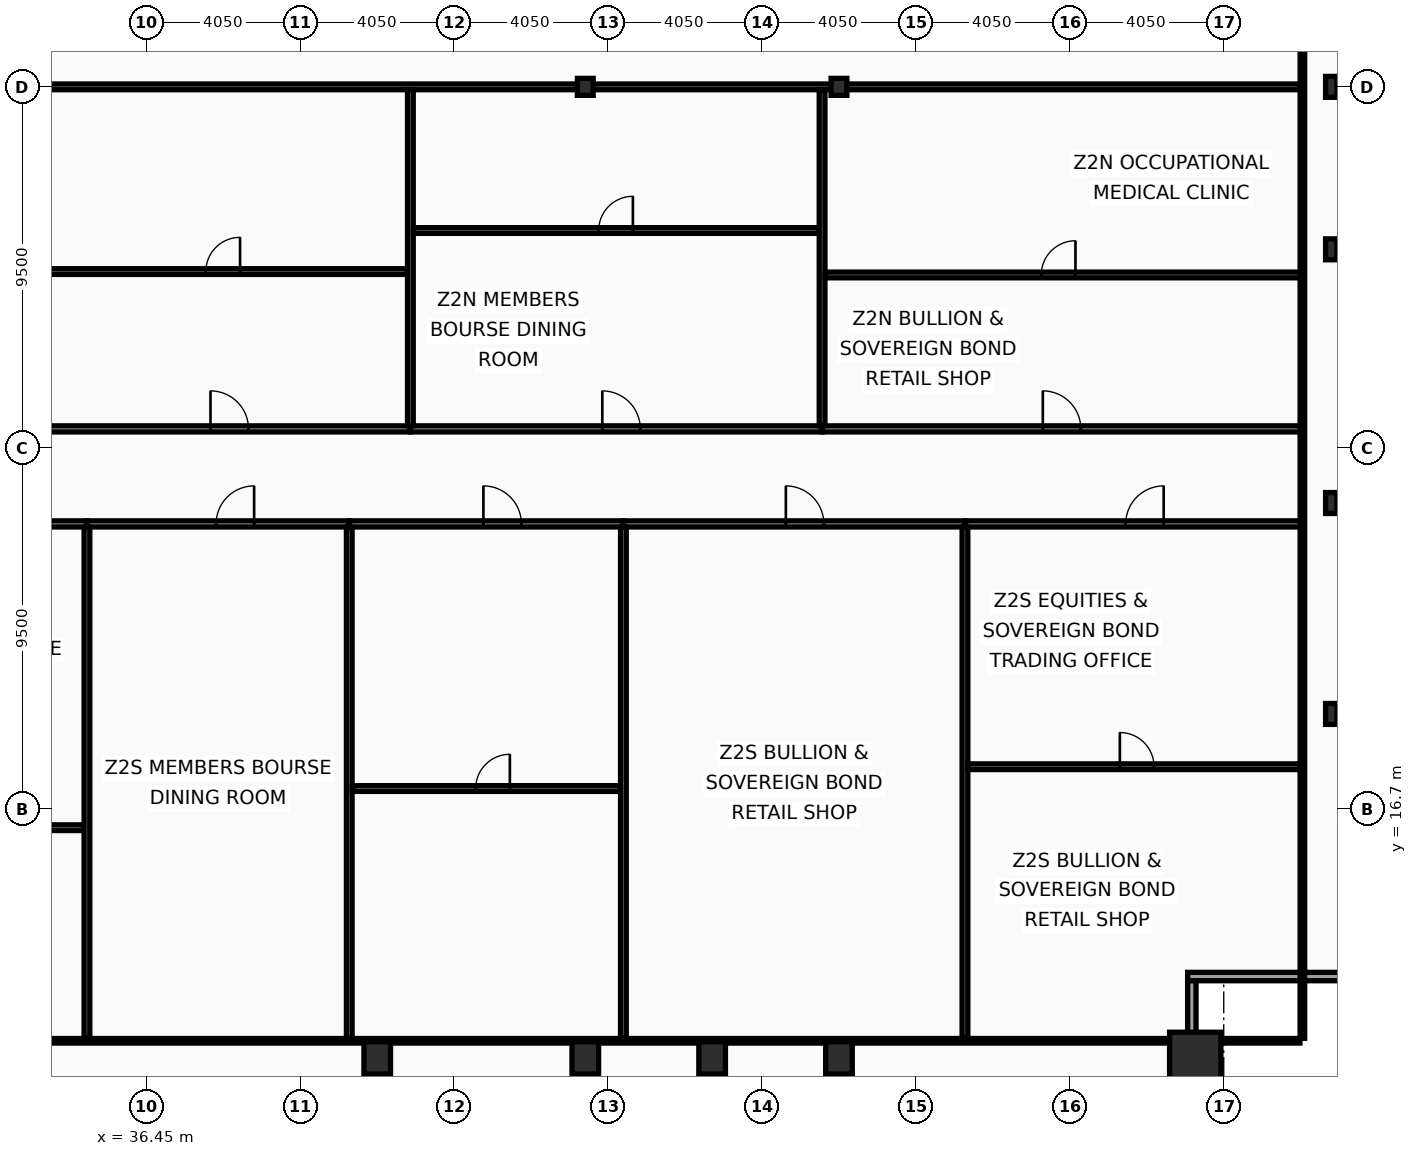
"""IFC4 building model, lengths in metres.
Left out: names, types, materials, properties, quantities, classifications, styles, units other than length and angle.
Written with IfcOpenShell. Run it as: python <this file> out.ifc"""

import sys

from ifc_helpers import new_model, si_unit, direction, frame, frame_2d, origin, origin_2d, place, context, subcontext, project, spatial, rectangle, hollow_rectangle, i_section, extrude, element, fill, save


model = new_model("IFC4")
c1 = context("Model", 3, precision=1e-05, world=origin(), true_north=direction((0.0, 1.0)))
c2 = subcontext(c1, "Body", "Model", "MODEL_VIEW")
j1 = project(units=[si_unit("LENGTHUNIT", "METRE"), si_unit("PLANEANGLEUNIT", "RADIAN")], contexts=[c1])
p1 = place(None, origin())
s1 = spatial("IfcSite", under=j1, at=p1, CompositionType="ELEMENT")
p2 = place(p1, origin())
s2 = spatial("IfcBuilding", under=s1, at=p2, CompositionType="ELEMENT")
p3 = place(p2, frame((0.0, 0.0, 139.8)))
s3 = spatial("IfcBuildingStorey", under=s2, at=p3, CompositionType="ELEMENT", Elevation=139.8)
p4 = place(p3, frame((64.05, 10.15, 0.0), z_axis=(0.0, 0.0, 1.0), x_axis=(1.0, 0.0, 0.0)))
e1 = element("IfcColumn", 1, at=p4, inside=s3, PredefinedType="COLUMN", context=c2, shape_type="SweptSolid", body=[
    extrude(hollow_rectangle(XDim=1.35, YDim=1.35, WallThickness=0.065, at=origin_2d()), origin(), (0.0, 0.0, 1.0), 3.6),
])
for number, where, z_axis, x_axis in (
    (2, (42.525, 10.15, 0.0), (0.0, 0.0, 1.0), (1.0, 0.0, 0.0)),
    (3, (48.0, 10.15, 0.0), (0.0, 0.0, 1.0), (1.0, 0.0, 0.0)),
    (4, (51.337, 10.15, 0.0), (0.0, 0.0, 1.0), (1.0, 0.0, 0.0)),
    (5, (54.675, 10.15, 0.0), (0.0, 0.0, 1.0), (1.0, 0.0, 0.0)),
):
    element("IfcColumn", number, at=place(p3, frame(where, z_axis=z_axis, x_axis=x_axis)), inside=s3, PredefinedType="COLUMN", context=c2, shape_type="SweptSolid", body=[
        extrude(hollow_rectangle(XDim=0.7, YDim=0.85, WallThickness=0.05, at=origin_2d()), origin(), (0.0, 0.0, 1.0), 3.6),
    ])
for number, where, z_axis, x_axis in (
    (6, (67.63, 19.2, 0.0), (0.0, 0.0, 1.0), (1.0, 0.0, 0.0)),
    (7, (67.63, 24.75, 0.0), (0.0, 0.0, 1.0), (1.0, 0.0, 0.0)),
    (8, (67.63, 31.425, 0.0), (0.0, 0.0, 1.0), (1.0, 0.0, 0.0)),
    (9, (67.63, 35.7, 0.0), (0.0, 0.0, 1.0), (1.0, 0.0, 0.0)),
):
    element("IfcColumn", number, at=place(p3, frame(where, z_axis=z_axis, x_axis=x_axis)), inside=s3, PredefinedType="COLUMN", context=c2, shape_type="SweptSolid", body=[
        extrude(i_section(OverallWidth=0.3, OverallDepth=0.55, WebThickness=0.015, FlangeThickness=0.029, at=origin_2d()), origin(), (0.0, 0.0, 1.0), 3.6),
    ])
for number, where, z_axis, x_axis in (
    (10, (48.0, 35.7, 0.0), (0.0, 0.0, 1.0), (1.0, 0.0, 0.0)),
    (11, (54.675, 35.7, 0.0), (0.0, 0.0, 1.0), (1.0, 0.0, 0.0)),
):
    element("IfcColumn", number, at=place(p3, frame(where, z_axis=z_axis, x_axis=x_axis)), inside=s3, PredefinedType="COLUMN", context=c2, shape_type="SweptSolid", body=[
        extrude(i_section(OverallWidth=0.416, OverallDepth=0.446, WebThickness=0.039, FlangeThickness=0.063, at=origin_2d()), origin(), (0.0, 0.0, 1.0), 3.6),
    ])
p5 = place(p3, frame((68.07, 12.29, 0.0), z_axis=(0.0, 0.0, 1.0), x_axis=(-1.0, 0.0, 0.0)))
e12 = element("IfcWall", 12, at=p5, inside=s3, PredefinedType="SOLIDWALL", context=c2, shape_type="SweptSolid", body=[
    extrude(rectangle(XDim=4.22, YDim=0.22, at=frame_2d((2.11, 0.0))), origin(), (0.0, 0.0, 1.0), 2.83),
])
p6 = place(p3, frame((63.96, 12.18, 0.0), z_axis=(0.0, 0.0, 1.0), x_axis=(0.0, -1.0, 0.0)))
e13 = element("IfcWall", 13, at=p6, inside=s3, PredefinedType="SOLIDWALL", context=c2, shape_type="SweptSolid", body=[
    extrude(rectangle(XDim=3.91, YDim=0.22, at=frame_2d((1.955, 0.0))), origin(), (0.0, 0.0, 1.0), 2.83),
])
p7 = place(p3, frame((23.382, 24.2, 0.0), z_axis=(0.0, 0.0, 1.0), x_axis=(1.0, 0.0, 0.0)))
e14 = element("IfcWall", 14, at=p7, inside=s3, PredefinedType="PARTITIONING", context=c2, shape_type="SweptSolid", body=[
    extrude(rectangle(XDim=11.504, YDim=0.16, at=frame_2d((5.752, 0.0))), origin(), (0.0, 0.0, 1.0), 2.73),
])
p8 = place(p7, frame((5.332, 0.0, 0.0)))
e15 = element("IfcOpeningElement", 15, at=p8, cuts=e14, PredefinedType="OPENING", context=c2, shape_type="SweptSolid", body=[
    extrude(rectangle(XDim=1.0, YDim=2.05, at=frame_2d((0.5, 1.025))), frame((0.0, 0.09, 0.0), z_axis=(0.0, -1.0, 0.0), x_axis=(1.0, 0.0, 0.0)), (0.0, 0.0, 1.0), 0.18),
])
p9 = place(p3, frame((23.462, 16.207, 0.0), z_axis=(0.0, 0.0, 1.0), x_axis=(1.0, 0.0, 0.0)))
e16 = element("IfcWall", 16, at=p9, inside=s3, PredefinedType="PARTITIONING", context=c2, shape_type="SweptSolid", body=[
    extrude(rectangle(XDim=11.344, YDim=0.15, at=frame_2d((5.672, 0.0))), origin(), (0.0, 0.0, 1.0), 2.73),
])
p10 = place(p9, frame((5.177, 0.0, 0.0)))
e17 = element("IfcOpeningElement", 17, at=p10, cuts=e16, PredefinedType="OPENING", context=c2, shape_type="SweptSolid", body=[
    extrude(rectangle(XDim=0.9, YDim=2.05, at=frame_2d((0.45, 1.025))), frame((0.0, 0.085, 0.0), z_axis=(0.0, -1.0, 0.0), x_axis=(1.0, 0.0, 0.0)), (0.0, 0.0, 1.0), 0.17),
])
p11 = place(p3, frame((34.886, 24.2, 0.0), z_axis=(0.0, 0.0, 1.0), x_axis=(1.0, 0.0, 0.0)))
e18 = element("IfcWall", 18, at=p11, inside=s3, PredefinedType="PARTITIONING", context=c2, shape_type="SweptSolid", body=[
    extrude(rectangle(XDim=6.902, YDim=0.16, at=frame_2d((3.451, 0.0))), origin(), (0.0, 0.0, 1.0), 3.44),
])
p12 = place(p11, frame((3.399, 0.0, 0.0)))
e19 = element("IfcOpeningElement", 19, at=p12, cuts=e18, PredefinedType="OPENING", context=c2, shape_type="SweptSolid", body=[
    extrude(rectangle(XDim=1.0, YDim=2.05, at=frame_2d((0.5, 1.025))), frame((0.0, 0.09, 0.0), z_axis=(0.0, -1.0, 0.0), x_axis=(1.0, 0.0, 0.0)), (0.0, 0.0, 1.0), 0.18),
])
p13 = place(p3, frame((34.886, 10.665, 0.0), z_axis=(0.0, 0.0, 1.0), x_axis=(0.0, 1.0, 0.0)))
e20 = element("IfcWall", 20, at=p13, inside=s3, PredefinedType="PARTITIONING", context=c2, shape_type="SweptSolid", body=[
    extrude(rectangle(XDim=13.45, YDim=0.15, at=frame_2d((6.725, 0.0))), origin(), (0.0, 0.0, 1.0), 2.93),
])
p14 = place(p3, frame((41.789, 24.2, 0.0), z_axis=(0.0, 0.0, 1.0), x_axis=(1.0, 0.0, 0.0)))
e21 = element("IfcWall", 21, at=p14, inside=s3, PredefinedType="PARTITIONING", context=c2, shape_type="SweptSolid", body=[
    extrude(rectangle(XDim=7.214, YDim=0.16, at=frame_2d((3.607, 0.0))), origin(), (0.0, 0.0, 1.0), 2.73),
])
p15 = place(p14, frame((3.53, 0.0, 0.0)))
e22 = element("IfcOpeningElement", 22, at=p15, cuts=e21, PredefinedType="OPENING", context=c2, shape_type="SweptSolid", body=[
    extrude(rectangle(XDim=1.0, YDim=2.05, at=frame_2d((0.5, 1.025))), frame((0.0, 0.09, 0.0), z_axis=(0.0, -1.0, 0.0), x_axis=(1.0, 0.0, 0.0)), (0.0, 0.0, 1.0), 0.18),
])
p16 = place(p3, frame((41.789, 10.665, 0.0), z_axis=(0.0, 0.0, 1.0), x_axis=(0.0, 1.0, 0.0)))
e23 = element("IfcWall", 23, at=p16, inside=s3, PredefinedType="PARTITIONING", context=c2, shape_type="SweptSolid", body=[
    extrude(rectangle(XDim=13.45, YDim=0.15, at=frame_2d((6.725, 0.0))), origin(), (0.0, 0.0, 1.0), 2.93),
])
p17 = place(p3, frame((41.869, 17.238, 0.0), z_axis=(0.0, 0.0, 1.0), x_axis=(1.0, 0.0, 0.0)))
e24 = element("IfcWall", 24, at=p17, inside=s3, PredefinedType="PARTITIONING", context=c2, shape_type="SweptSolid", body=[
    extrude(rectangle(XDim=7.054, YDim=0.15, at=frame_2d((3.527, 0.0))), origin(), (0.0, 0.0, 1.0), 2.73),
])
p18 = place(p17, frame((3.246, 0.0, 0.0)))
e25 = element("IfcOpeningElement", 25, at=p18, cuts=e24, PredefinedType="OPENING", context=c2, shape_type="SweptSolid", body=[
    extrude(rectangle(XDim=0.9, YDim=2.05, at=frame_2d((0.45, 1.025))), frame((0.0, 0.085, 0.0), z_axis=(0.0, -1.0, 0.0), x_axis=(1.0, 0.0, 0.0)), (0.0, 0.0, 1.0), 0.17),
])
p19 = place(p3, frame((49.003, 24.2, 0.0), z_axis=(0.0, 0.0, 1.0), x_axis=(1.0, 0.0, 0.0)))
e26 = element("IfcWall", 26, at=p19, inside=s3, PredefinedType="PARTITIONING", context=c2, shape_type="SweptSolid", body=[
    extrude(rectangle(XDim=8.988, YDim=0.16, at=frame_2d((4.494, 0.0))), origin(), (0.0, 0.0, 1.0), 2.73),
])
p20 = place(p19, frame((4.275, 0.0, 0.0)))
e27 = element("IfcOpeningElement", 27, at=p20, cuts=e26, PredefinedType="OPENING", context=c2, shape_type="SweptSolid", body=[
    extrude(rectangle(XDim=1.0, YDim=2.05, at=frame_2d((0.5, 1.025))), frame((0.0, 0.09, 0.0), z_axis=(0.0, -1.0, 0.0), x_axis=(1.0, 0.0, 0.0)), (0.0, 0.0, 1.0), 0.18),
])
p21 = place(p3, frame((49.003, 10.665, 0.0), z_axis=(0.0, 0.0, 1.0), x_axis=(0.0, 1.0, 0.0)))
e28 = element("IfcWall", 28, at=p21, inside=s3, PredefinedType="PARTITIONING", context=c2, shape_type="SweptSolid", body=[
    extrude(rectangle(XDim=13.45, YDim=0.15, at=frame_2d((6.725, 0.0))), origin(), (0.0, 0.0, 1.0), 2.93),
])
p22 = place(p3, frame((57.99, 24.2, 0.0), z_axis=(0.0, 0.0, 1.0), x_axis=(1.0, 0.0, 0.0)))
e29 = element("IfcWall", 29, at=p22, inside=s3, PredefinedType="PARTITIONING", context=c2, shape_type="SweptSolid", body=[
    extrude(rectangle(XDim=8.88, YDim=0.16, at=frame_2d((4.44, 0.0))), origin(), (0.0, 0.0, 1.0), 3.44),
])
p23 = place(p22, frame((4.229, 0.0, 0.0)))
e30 = element("IfcOpeningElement", 30, at=p23, cuts=e29, PredefinedType="OPENING", context=c2, shape_type="SweptSolid", body=[
    extrude(rectangle(XDim=1.0, YDim=2.05, at=frame_2d((0.5, 1.025))), frame((0.0, 0.09, 0.0), z_axis=(0.0, -1.0, 0.0), x_axis=(1.0, 0.0, 0.0)), (0.0, 0.0, 1.0), 0.18),
])
p24 = place(p3, frame((57.99, 10.665, 0.0), z_axis=(0.0, 0.0, 1.0), x_axis=(0.0, 1.0, 0.0)))
e31 = element("IfcWall", 31, at=p24, inside=s3, PredefinedType="PARTITIONING", context=c2, shape_type="SweptSolid", body=[
    extrude(rectangle(XDim=13.45, YDim=0.15, at=frame_2d((6.725, 0.0))), origin(), (0.0, 0.0, 1.0), 2.73),
])
p25 = place(p3, frame((58.07, 17.811, 0.0), z_axis=(0.0, 0.0, 1.0), x_axis=(1.0, 0.0, 0.0)))
e32 = element("IfcWall", 32, at=p25, inside=s3, PredefinedType="PARTITIONING", context=c2, shape_type="SweptSolid", body=[
    extrude(rectangle(XDim=8.735, YDim=0.15, at=frame_2d((4.367, 0.0))), origin(), (0.0, 0.0, 1.0), 2.83),
])
p26 = place(p25, frame((3.996, 0.0, 0.0)))
e33 = element("IfcOpeningElement", 33, at=p26, cuts=e32, PredefinedType="OPENING", context=c2, shape_type="SweptSolid", body=[
    extrude(rectangle(XDim=0.9, YDim=2.05, at=frame_2d((0.45, 1.025))), frame((0.0, 0.085, 0.0), z_axis=(0.0, -1.0, 0.0), x_axis=(1.0, 0.0, 0.0)), (0.0, 0.0, 1.0), 0.17),
])
p27 = place(p3, frame((21.81, 35.7, 0.0), z_axis=(0.0, 0.0, 1.0), x_axis=(1.0, 0.0, 0.0)))
e34 = element("IfcWall", 34, at=p27, inside=s3, PredefinedType="PARTITIONING", context=c2, shape_type="SweptSolid", body=[
    extrude(rectangle(XDim=44.995, YDim=0.15, at=frame_2d((22.498, 0.0))), origin(), (0.0, 0.0, 1.0), 2.73),
])
p28 = place(p3, frame((33.466, 26.7, 0.0), z_axis=(0.0, 0.0, 1.0), x_axis=(1.0, 0.0, 0.0)))
e35 = element("IfcWall", 35, at=p28, inside=s3, PredefinedType="PARTITIONING", context=c2, shape_type="SweptSolid", body=[
    extrude(rectangle(XDim=9.931, YDim=0.16, at=frame_2d((4.965, 0.0))), origin(), (0.0, 0.0, 1.0), 2.73),
])
p29 = place(p28, frame((4.671, 0.0, 0.0)))
e36 = element("IfcOpeningElement", 36, at=p29, cuts=e35, PredefinedType="OPENING", context=c2, shape_type="SweptSolid", body=[
    extrude(rectangle(XDim=1.0, YDim=2.05, at=frame_2d((0.5, 1.025))), frame((0.0, 0.09, 0.0), z_axis=(0.0, -1.0, 0.0), x_axis=(1.0, 0.0, 0.0)), (0.0, 0.0, 1.0), 0.18),
])
p30 = place(p3, frame((33.546, 30.84, 0.0), z_axis=(0.0, 0.0, 1.0), x_axis=(1.0, 0.0, 0.0)))
e37 = element("IfcWall", 37, at=p30, inside=s3, PredefinedType="PARTITIONING", context=c2, shape_type="SweptSolid", body=[
    extrude(rectangle(XDim=9.771, YDim=0.15, at=frame_2d((4.885, 0.0))), origin(), (0.0, 0.0, 1.0), 2.73),
])
p31 = place(p30, frame((4.469, 0.0, 0.0)))
e38 = element("IfcOpeningElement", 38, at=p31, cuts=e37, PredefinedType="OPENING", context=c2, shape_type="SweptSolid", body=[
    extrude(rectangle(XDim=0.9, YDim=2.05, at=frame_2d((0.45, 1.025))), frame((0.0, 0.085, 0.0), z_axis=(0.0, -1.0, 0.0), x_axis=(1.0, 0.0, 0.0)), (0.0, 0.0, 1.0), 0.17),
])
p32 = place(p3, frame((43.397, 26.7, 0.0), z_axis=(0.0, 0.0, 1.0), x_axis=(1.0, 0.0, 0.0)))
e39 = element("IfcWall", 39, at=p32, inside=s3, PredefinedType="PARTITIONING", context=c2, shape_type="SweptSolid", body=[
    extrude(rectangle(XDim=10.833, YDim=0.16, at=frame_2d((5.417, 0.0))), origin(), (0.0, 0.0, 1.0), 2.73),
])
p33 = place(p32, frame((5.05, 0.0, 0.0)))
e40 = element("IfcOpeningElement", 40, at=p33, cuts=e39, PredefinedType="OPENING", context=c2, shape_type="SweptSolid", body=[
    extrude(rectangle(XDim=1.0, YDim=2.05, at=frame_2d((0.5, 1.025))), frame((0.0, 0.09, 0.0), z_axis=(0.0, -1.0, 0.0), x_axis=(1.0, 0.0, 0.0)), (0.0, 0.0, 1.0), 0.18),
])
p34 = place(p3, frame((43.397, 26.785, 0.0), z_axis=(0.0, 0.0, 1.0), x_axis=(0.0, 1.0, 0.0)))
e41 = element("IfcWall", 41, at=p34, inside=s3, PredefinedType="PARTITIONING", context=c2, shape_type="SweptSolid", body=[
    extrude(rectangle(XDim=8.835, YDim=0.15, at=frame_2d((4.417, 0.0))), origin(), (0.0, 0.0, 1.0), 2.93),
])
p35 = place(p3, frame((43.477, 31.92, 0.0), z_axis=(0.0, 0.0, 1.0), x_axis=(1.0, 0.0, 0.0)))
e42 = element("IfcWall", 42, at=p35, inside=s3, PredefinedType="PARTITIONING", context=c2, shape_type="SweptSolid", body=[
    extrude(rectangle(XDim=10.674, YDim=0.15, at=frame_2d((5.337, 0.0))), origin(), (0.0, 0.0, 1.0), 2.73),
])
p36 = place(p35, frame((4.875, 0.0, 0.0)))
e43 = element("IfcOpeningElement", 43, at=p36, cuts=e42, PredefinedType="OPENING", context=c2, shape_type="SweptSolid", body=[
    extrude(rectangle(XDim=0.9, YDim=2.05, at=frame_2d((0.45, 1.025))), frame((0.0, 0.085, 0.0), z_axis=(0.0, -1.0, 0.0), x_axis=(1.0, 0.0, 0.0)), (0.0, 0.0, 1.0), 0.17),
])
p37 = place(p3, frame((54.231, 26.7, 0.0), z_axis=(0.0, 0.0, 1.0), x_axis=(1.0, 0.0, 0.0)))
e44 = element("IfcWall", 44, at=p37, inside=s3, PredefinedType="PARTITIONING", context=c2, shape_type="SweptSolid", body=[
    extrude(rectangle(XDim=12.639, YDim=0.16, at=frame_2d((6.32, 0.0))), origin(), (0.0, 0.0, 1.0), 2.73),
])
p38 = place(p37, frame((5.809, 0.0, 0.0)))
e45 = element("IfcOpeningElement", 45, at=p38, cuts=e44, PredefinedType="OPENING", context=c2, shape_type="SweptSolid", body=[
    extrude(rectangle(XDim=1.0, YDim=2.05, at=frame_2d((0.5, 1.025))), frame((0.0, 0.09, 0.0), z_axis=(0.0, -1.0, 0.0), x_axis=(1.0, 0.0, 0.0)), (0.0, 0.0, 1.0), 0.18),
])
p39 = place(p3, frame((54.231, 26.785, 0.0), z_axis=(0.0, 0.0, 1.0), x_axis=(0.0, 1.0, 0.0)))
e46 = element("IfcWall", 46, at=p39, inside=s3, PredefinedType="PARTITIONING", context=c2, shape_type="SweptSolid", body=[
    extrude(rectangle(XDim=8.835, YDim=0.15, at=frame_2d((4.417, 0.0))), origin(), (0.0, 0.0, 1.0), 2.73),
])
p40 = place(p3, frame((54.311, 30.75, 0.0), z_axis=(0.0, 0.0, 1.0), x_axis=(1.0, 0.0, 0.0)))
e47 = element("IfcWall", 47, at=p40, inside=s3, PredefinedType="PARTITIONING", context=c2, shape_type="SweptSolid", body=[
    extrude(rectangle(XDim=12.494, YDim=0.15, at=frame_2d((6.247, 0.0))), origin(), (0.0, 0.0, 1.0), 2.73),
])
p41 = place(p40, frame((5.688, 0.0, 0.0)))
e48 = element("IfcOpeningElement", 48, at=p41, cuts=e47, PredefinedType="OPENING", context=c2, shape_type="SweptSolid", body=[
    extrude(rectangle(XDim=0.9, YDim=2.05, at=frame_2d((0.45, 1.025))), frame((0.0, 0.085, 0.0), z_axis=(0.0, -1.0, 0.0), x_axis=(1.0, 0.0, 0.0)), (0.0, 0.0, 1.0), 0.17),
])
p42 = place(p3, frame((66.87, 10.665, 0.0), z_axis=(0.0, 0.0, 1.0), x_axis=(0.0, 1.0, 0.0)))
e49 = element("IfcWall", 49, at=p42, inside=s3, PredefinedType="PARTITIONING", context=c2, shape_type="SweptSolid", body=[
    extrude(rectangle(XDim=42.11, YDim=0.12, at=frame_2d((21.055, 0.0))), origin(), (0.0, 0.0, 1.0), 2.73),
])
p43 = place(p3, frame((6.095, 10.6, 0.0), z_axis=(0.0, 0.0, 1.0), x_axis=(1.0, 0.0, 0.0)))
e50 = element("IfcWall", 50, at=p43, inside=s3, PredefinedType="PARTITIONING", context=c2, shape_type="SweptSolid", body=[
    extrude(rectangle(XDim=60.71, YDim=0.12, at=frame_2d((30.355, 0.0))), origin(), (0.0, 0.0, 1.0), 2.73),
])
p44 = place(p12, origin())
e51 = element("IfcDoor", 51, at=p44, inside=s3, OperationType="SINGLE_SWING_RIGHT", PredefinedType="DOOR", context=c2, shape_type="SweptSolid", body=[
    extrude(rectangle(XDim=1.0, YDim=2.05, at=frame_2d((0.5, 1.025))), frame((0.0, 0.025, 0.0), z_axis=(0.0, -1.0, 0.0), x_axis=(1.0, 0.0, 0.0)), (0.0, 0.0, 1.0), 0.05),
])
fill(e19, e51)
p45 = place(p15, origin())
e52 = element("IfcDoor", 52, at=p45, inside=s3, OperationType="SINGLE_SWING_LEFT", PredefinedType="DOOR", context=c2, shape_type="SweptSolid", body=[
    extrude(rectangle(XDim=1.0, YDim=2.05, at=frame_2d((0.5, 1.025))), frame((0.0, 0.025, 0.0), z_axis=(0.0, -1.0, 0.0), x_axis=(1.0, 0.0, 0.0)), (0.0, 0.0, 1.0), 0.05),
])
fill(e22, e52)
p46 = place(p18, origin())
e53 = element("IfcDoor", 53, at=p46, inside=s3, OperationType="SINGLE_SWING_RIGHT", PredefinedType="DOOR", context=c2, shape_type="SweptSolid", body=[
    extrude(rectangle(XDim=0.9, YDim=2.05, at=frame_2d((0.45, 1.025))), frame((0.0, 0.025, 0.0), z_axis=(0.0, -1.0, 0.0), x_axis=(1.0, 0.0, 0.0)), (0.0, 0.0, 1.0), 0.05),
])
fill(e25, e53)
p47 = place(p20, origin())
e54 = element("IfcDoor", 54, at=p47, inside=s3, OperationType="SINGLE_SWING_LEFT", PredefinedType="DOOR", context=c2, shape_type="SweptSolid", body=[
    extrude(rectangle(XDim=1.0, YDim=2.05, at=frame_2d((0.5, 1.025))), frame((0.0, 0.025, 0.0), z_axis=(0.0, -1.0, 0.0), x_axis=(1.0, 0.0, 0.0)), (0.0, 0.0, 1.0), 0.05),
])
fill(e27, e54)
p48 = place(p23, origin())
e55 = element("IfcDoor", 55, at=p48, inside=s3, OperationType="SINGLE_SWING_RIGHT", PredefinedType="DOOR", context=c2, shape_type="SweptSolid", body=[
    extrude(rectangle(XDim=1.0, YDim=2.05, at=frame_2d((0.5, 1.025))), frame((0.0, 0.025, 0.0), z_axis=(0.0, -1.0, 0.0), x_axis=(1.0, 0.0, 0.0)), (0.0, 0.0, 1.0), 0.05),
])
fill(e30, e55)
p49 = place(p26, origin())
e56 = element("IfcDoor", 56, at=p49, inside=s3, OperationType="SINGLE_SWING_LEFT", PredefinedType="DOOR", context=c2, shape_type="SweptSolid", body=[
    extrude(rectangle(XDim=0.9, YDim=2.05, at=frame_2d((0.45, 1.025))), frame((0.0, 0.025, 0.0), z_axis=(0.0, -1.0, 0.0), x_axis=(1.0, 0.0, 0.0)), (0.0, 0.0, 1.0), 0.05),
])
fill(e33, e56)
p50 = place(p29, origin())
e57 = element("IfcDoor", 57, at=p50, inside=s3, OperationType="SINGLE_SWING_LEFT", PredefinedType="DOOR", context=c2, shape_type="SweptSolid", body=[
    extrude(rectangle(XDim=1.0, YDim=2.05, at=frame_2d((0.5, 1.025))), frame((0.0, 0.025, 0.0), z_axis=(0.0, -1.0, 0.0), x_axis=(1.0, 0.0, 0.0)), (0.0, 0.0, 1.0), 0.05),
])
fill(e36, e57)
p51 = place(p31, origin())
e58 = element("IfcDoor", 58, at=p51, inside=s3, OperationType="SINGLE_SWING_RIGHT", PredefinedType="DOOR", context=c2, shape_type="SweptSolid", body=[
    extrude(rectangle(XDim=0.9, YDim=2.05, at=frame_2d((0.45, 1.025))), frame((0.0, 0.025, 0.0), z_axis=(0.0, -1.0, 0.0), x_axis=(1.0, 0.0, 0.0)), (0.0, 0.0, 1.0), 0.05),
])
fill(e38, e58)
p52 = place(p33, origin())
e59 = element("IfcDoor", 59, at=p52, inside=s3, OperationType="SINGLE_SWING_LEFT", PredefinedType="DOOR", context=c2, shape_type="SweptSolid", body=[
    extrude(rectangle(XDim=1.0, YDim=2.05, at=frame_2d((0.5, 1.025))), frame((0.0, 0.025, 0.0), z_axis=(0.0, -1.0, 0.0), x_axis=(1.0, 0.0, 0.0)), (0.0, 0.0, 1.0), 0.05),
])
fill(e40, e59)
p53 = place(p36, origin())
e60 = element("IfcDoor", 60, at=p53, inside=s3, OperationType="SINGLE_SWING_RIGHT", PredefinedType="DOOR", context=c2, shape_type="SweptSolid", body=[
    extrude(rectangle(XDim=0.9, YDim=2.05, at=frame_2d((0.45, 1.025))), frame((0.0, 0.025, 0.0), z_axis=(0.0, -1.0, 0.0), x_axis=(1.0, 0.0, 0.0)), (0.0, 0.0, 1.0), 0.05),
])
fill(e43, e60)
p54 = place(p38, origin())
e61 = element("IfcDoor", 61, at=p54, inside=s3, OperationType="SINGLE_SWING_LEFT", PredefinedType="DOOR", context=c2, shape_type="SweptSolid", body=[
    extrude(rectangle(XDim=1.0, YDim=2.05, at=frame_2d((0.5, 1.025))), frame((0.0, 0.025, 0.0), z_axis=(0.0, -1.0, 0.0), x_axis=(1.0, 0.0, 0.0)), (0.0, 0.0, 1.0), 0.05),
])
fill(e45, e61)
p55 = place(p41, origin())
e62 = element("IfcDoor", 62, at=p55, inside=s3, OperationType="SINGLE_SWING_RIGHT", PredefinedType="DOOR", context=c2, shape_type="SweptSolid", body=[
    extrude(rectangle(XDim=0.9, YDim=2.05, at=frame_2d((0.45, 1.025))), frame((0.0, 0.025, 0.0), z_axis=(0.0, -1.0, 0.0), x_axis=(1.0, 0.0, 0.0)), (0.0, 0.0, 1.0), 0.05),
])
fill(e48, e62)
save(model, sys.argv[1])
